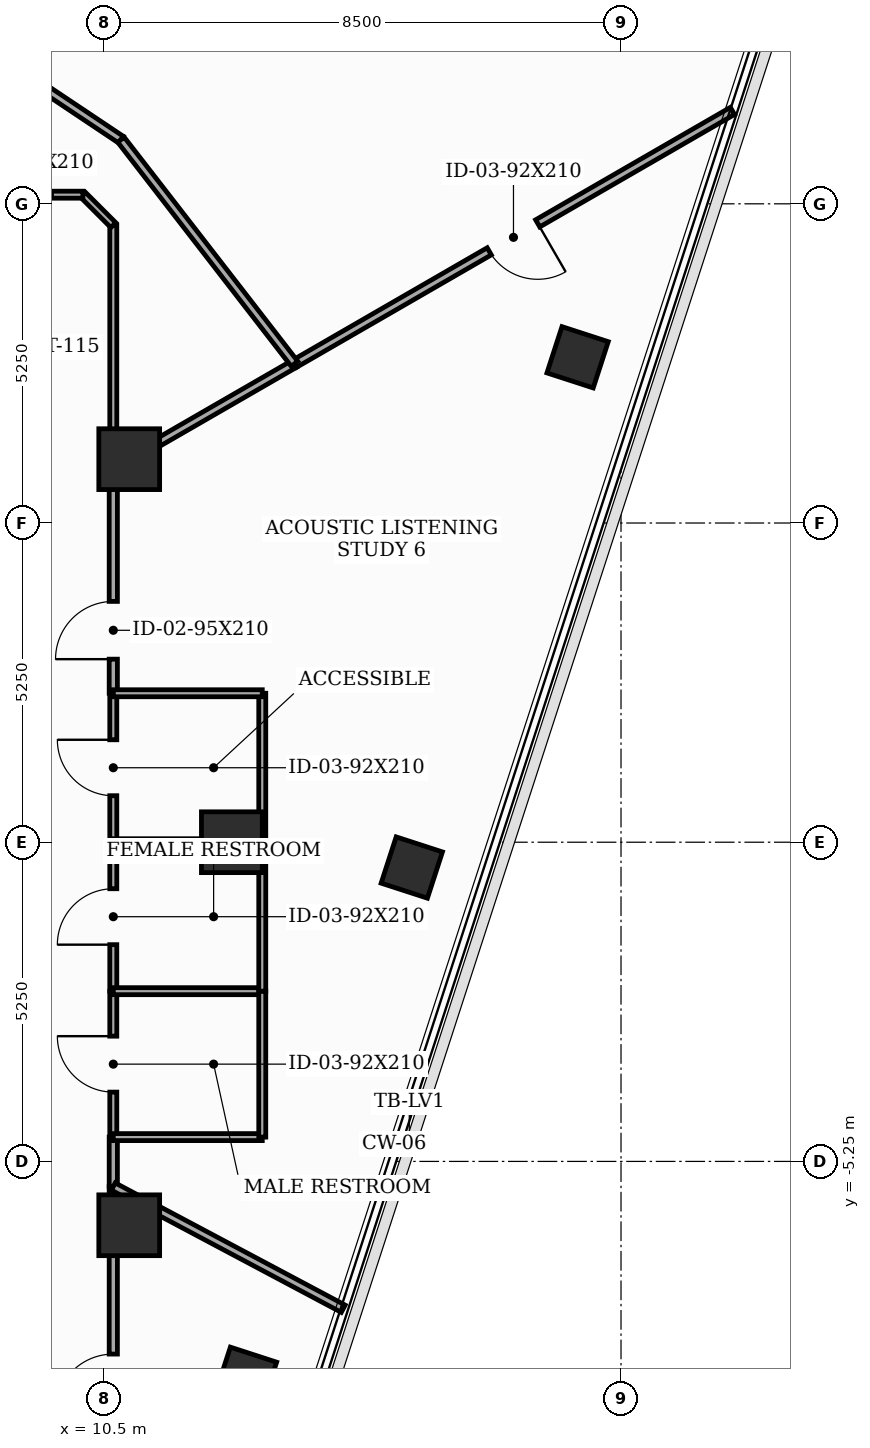
"""IFC4 building model, lengths in metres.
Left out: names, types, materials, properties, quantities, classifications, styles, units other than length and angle.
Written with IfcOpenShell. Run it as: python <this file> out.ifc"""

import sys

from ifc_helpers import new_model, si_unit, direction, frame, frame_2d, origin, origin_2d, place, context, subcontext, project, spatial, rectangle, extrude, element, fill, save


model = new_model("IFC4")
c1 = context("Model", 3, precision=1e-05, world=origin(), true_north=direction((0.0, 1.0)))
c2 = subcontext(c1, "Body", "Model", "MODEL_VIEW")
j1 = project(units=[si_unit("LENGTHUNIT", "METRE"), si_unit("PLANEANGLEUNIT", "RADIAN")], contexts=[c1])
p1 = place(None, origin())
s1 = spatial("IfcSite", under=j1, at=p1, CompositionType="ELEMENT")
p2 = place(p1, origin())
s2 = spatial("IfcBuilding", under=s1, at=p2, CompositionType="ELEMENT")
p3 = place(p2, frame((0.0, 0.0, 305.4)))
s3 = spatial("IfcBuildingStorey", under=s2, at=p3, CompositionType="ELEMENT", Elevation=305.4)
for number, where, z_axis, x_axis in (
    (1, (12.6, 0.0, 0.0), (0.0, 0.0, 1.0), (1.0, 0.0, 0.0)),
    (2, (10.912, 6.3, 0.0), (0.0, 0.0, 1.0), (1.0, 0.0, 0.0)),
    (3, (10.912, -6.3, 0.0), (0.0, 0.0, 1.0), (1.0, 0.0, 0.0)),
):
    element("IfcColumn", number, at=place(p3, frame(where, z_axis=z_axis, x_axis=x_axis)), inside=s3, PredefinedType="COLUMN", context=c2, shape_type="SweptSolid", body=[
        extrude(rectangle(XDim=1.0, YDim=1.0, at=origin_2d()), origin(), (0.0, 0.0, 1.0), 3.7),
    ])
for number, where, z_axis, x_axis in (
    (4, (12.833, -8.809, 0.0), (0.0, 0.0, 1.0), (0.309, 0.951, 0.0)),
    (5, (15.559, -0.417, 0.0), (0.0, 0.0, 1.0), (0.309, 0.951, 0.0)),
    (6, (18.286, 7.976, 0.0), (0.0, 0.0, 1.0), (0.309, 0.951, 0.0)),
):
    element("IfcColumn", number, at=place(p3, frame(where, z_axis=z_axis, x_axis=x_axis)), inside=s3, PredefinedType="COLUMN", context=c2, shape_type="SweptSolid", body=[
        extrude(rectangle(XDim=0.8, YDim=0.8, at=origin_2d()), origin(), (0.0, 0.0, 1.0), 3.7),
    ])
p4 = place(p3, frame((10.65, -10.15, 0.0), z_axis=(0.0, 0.0, 1.0), x_axis=(0.0, 1.0, 0.0)))
e7 = element("IfcWall", 7, at=p4, inside=s3, PredefinedType="PARTITIONING", context=c2, shape_type="SweptSolid", body=[
    extrude(rectangle(XDim=4.487, YDim=0.135, at=frame_2d((2.243, 0.0))), origin(), (0.0, 0.0, 1.0), 2.885),
])
p5 = place(p4, frame((0.781, 0.0, 0.0)))
e8 = element("IfcOpeningElement", 8, at=p5, cuts=e7, PredefinedType="OPENING", context=c2, shape_type="SweptSolid", body=[
    extrude(rectangle(XDim=0.95, YDim=2.1, at=frame_2d((0.475, 1.05))), frame((0.0, 0.077, 0.0), z_axis=(0.0, -1.0, 0.0), x_axis=(1.0, 0.0, 0.0)), (0.0, 0.0, 1.0), 0.155),
])
p6 = place(p3, frame((10.65, -4.85, 0.0), z_axis=(0.0, 0.0, 1.0), x_axis=(0.0, 1.0, 0.0)))
e9 = element("IfcWall", 9, at=p6, inside=s3, PredefinedType="PARTITIONING", context=c2, shape_type="SweptSolid", body=[
    extrude(rectangle(XDim=2.4, YDim=0.115, at=frame_2d((1.2, 0.0))), origin(), (0.0, 0.0, 1.0), 3.5),
])
p7 = place(p6, frame((0.74, 0.0, 0.0)))
e10 = element("IfcOpeningElement", 10, at=p7, cuts=e9, PredefinedType="OPENING", context=c2, shape_type="SweptSolid", body=[
    extrude(rectangle(XDim=0.92, YDim=2.1, at=frame_2d((0.46, 1.05))), frame((0.0, 0.067, 0.0), z_axis=(0.0, -1.0, 0.0), x_axis=(1.0, 0.0, 0.0)), (0.0, 0.0, 1.0), 0.135),
])
p8 = place(p3, frame((10.65, -2.45, 0.0), z_axis=(0.0, 0.0, 1.0), x_axis=(0.0, 1.0, 0.0)))
e11 = element("IfcWall", 11, at=p8, inside=s3, PredefinedType="PARTITIONING", context=c2, shape_type="SweptSolid", body=[
    extrude(rectangle(XDim=2.45, YDim=0.115, at=frame_2d((1.225, 0.0))), origin(), (0.0, 0.0, 1.0), 2.885),
])
p9 = place(p8, frame((0.765, 0.0, 0.0)))
e12 = element("IfcOpeningElement", 12, at=p9, cuts=e11, PredefinedType="OPENING", context=c2, shape_type="SweptSolid", body=[
    extrude(rectangle(XDim=0.92, YDim=2.1, at=frame_2d((0.46, 1.05))), frame((0.0, 0.067, 0.0), z_axis=(0.0, -1.0, 0.0), x_axis=(1.0, 0.0, 0.0)), (0.0, 0.0, 1.0), 0.135),
])
p10 = place(p3, frame((10.65, 0.0, 0.0), z_axis=(0.0, 0.0, 1.0), x_axis=(0.0, 1.0, 0.0)))
e13 = element("IfcWall", 13, at=p10, inside=s3, PredefinedType="PARTITIONING", context=c2, shape_type="SweptSolid", body=[
    extrude(rectangle(XDim=2.45, YDim=0.115, at=frame_2d((1.225, 0.0))), origin(), (0.0, 0.0, 1.0), 2.885),
])
p11 = place(p10, frame((0.765, 0.0, 0.0)))
e14 = element("IfcOpeningElement", 14, at=p11, cuts=e13, PredefinedType="OPENING", context=c2, shape_type="SweptSolid", body=[
    extrude(rectangle(XDim=0.92, YDim=2.1, at=frame_2d((0.46, 1.05))), frame((0.0, 0.067, 0.0), z_axis=(0.0, -1.0, 0.0), x_axis=(1.0, 0.0, 0.0)), (0.0, 0.0, 1.0), 0.135),
])
p12 = place(p3, frame((10.65, -5.663, 0.0), z_axis=(0.0, 0.0, 1.0), x_axis=(0.0, 1.0, 0.0)))
e15 = element("IfcWall", 15, at=p12, inside=s3, PredefinedType="PARTITIONING", context=c2, shape_type="SweptSolid", body=[
    extrude(rectangle(XDim=0.813, YDim=0.135, at=frame_2d((0.406, 0.0))), origin(), (0.0, 0.0, 1.0), 3.5),
])
p13 = place(p3, frame((10.65, 2.45, 0.0), z_axis=(0.0, 0.0, 1.0), x_axis=(0.0, 1.0, 0.0)))
e16 = element("IfcWall", 16, at=p13, inside=s3, PredefinedType="PARTITIONING", context=c2, shape_type="SweptSolid", body=[
    extrude(rectangle(XDim=3.699, YDim=0.135, at=frame_2d((1.85, 0.0))), origin(), (0.0, 0.0, 1.0), 3.5),
])
p14 = place(p13, frame((0.561, 0.0, 0.0)))
e17 = element("IfcOpeningElement", 17, at=p14, cuts=e16, PredefinedType="OPENING", context=c2, shape_type="SweptSolid", body=[
    extrude(rectangle(XDim=0.95, YDim=2.1, at=frame_2d((0.475, 1.05))), frame((0.0, 0.077, 0.0), z_axis=(0.0, -1.0, 0.0), x_axis=(1.0, 0.0, 0.0)), (0.0, 0.0, 1.0), 0.155),
])
p15 = place(p3, frame((10.65, 6.149, 0.0), z_axis=(0.0, 0.0, 1.0), x_axis=(0.0, 1.0, 0.0)))
e18 = element("IfcWall", 18, at=p15, inside=s3, PredefinedType="PARTITIONING", context=c2, shape_type="SweptSolid", body=[
    extrude(rectangle(XDim=4.001, YDim=0.115, at=frame_2d((2.0, 0.0))), origin(), (0.0, 0.0, 1.0), 2.885),
])
p16 = place(p3, frame((10.65, 10.15, 0.0), z_axis=(0.0, 0.0, 1.0), x_axis=(-0.707106781187, 0.707106781187, 0.0)))
e19 = element("IfcWall", 19, at=p16, inside=s3, PredefinedType="PARTITIONING", context=c2, shape_type="SweptSolid", body=[
    extrude(rectangle(XDim=0.707, YDim=0.115, at=frame_2d((0.354, 0.0))), origin(), (0.0, 0.0, 1.0), 3.5),
])
p17 = place(p3, frame((10.15, 10.65, 0.0), z_axis=(0.0, 0.0, 1.0), x_axis=(-1.0, 0.0, 0.0)))
e20 = element("IfcWall", 20, at=p17, inside=s3, PredefinedType="PARTITIONING", context=c2, shape_type="SweptSolid", body=[
    extrude(rectangle(XDim=4.956, YDim=0.115, at=frame_2d((2.478, 0.0))), origin(), (0.0, 0.0, 1.0), 2.885),
])
p18 = place(p17, frame((0.516, 0.0, 0.0)))
e21 = element("IfcOpeningElement", 21, at=p18, cuts=e20, PredefinedType="OPENING", context=c2, shape_type="SweptSolid", body=[
    extrude(rectangle(XDim=0.95, YDim=2.1, at=frame_2d((0.475, 1.05))), frame((0.0, 0.067, 0.0), z_axis=(0.0, -1.0, 0.0), x_axis=(1.0, 0.0, 0.0)), (0.0, 0.0, 1.0), 0.135),
])
p19 = place(p3, frame((14.432, -7.673, 0.0), z_axis=(0.0, 0.0, 1.0), x_axis=(-0.883046328231, 0.469285821433, 0.0)))
e22 = element("IfcWall", 22, at=p19, inside=s3, PredefinedType="PARTITIONING", context=c2, shape_type="SweptSolid", body=[
    extrude(rectangle(XDim=4.283, YDim=0.135, at=frame_2d((2.141, 0.0))), origin(), (0.0, 0.0, 1.0), 2.885),
])
for number, where, z_axis, x_axis in (
    (23, (13.1, -2.45, 0.0), (0.0, 0.0, 1.0), (-1.0, 0.0, 0.0)),
    (24, (10.65, -4.85, 0.0), (0.0, 0.0, 1.0), (1.0, 0.0, 0.0)),
):
    element("IfcWall", number, at=place(p3, frame(where, z_axis=z_axis, x_axis=x_axis)), inside=s3, PredefinedType="PARTITIONING", context=c2, shape_type="SweptSolid", body=[
        extrude(rectangle(XDim=2.45, YDim=0.115, at=frame_2d((1.225, 0.0))), origin(), (0.0, 0.0, 1.0), 2.885),
    ])
p20 = place(p3, frame((13.1, -4.85, 0.0), z_axis=(0.0, 0.0, 1.0), x_axis=(0.0, 1.0, 0.0)))
e25 = element("IfcWall", 25, at=p20, inside=s3, PredefinedType="PARTITIONING", context=c2, shape_type="SweptSolid", body=[
    extrude(rectangle(XDim=2.4, YDim=0.115, at=frame_2d((1.2, 0.0))), origin(), (0.0, 0.0, 1.0), 3.5),
])
p21 = place(p3, frame((13.1, 0.0, 0.0), z_axis=(0.0, 0.0, 1.0), x_axis=(-1.0, 0.0, 0.0)))
e26 = element("IfcWall", 26, at=p21, inside=s3, PredefinedType="PARTITIONING", context=c2, shape_type="SweptSolid", body=[
    extrude(rectangle(XDim=2.45, YDim=0.115, at=frame_2d((1.225, 0.0))), origin(), (0.0, 0.0, 1.0), 2.885),
])
for number, where, z_axis, x_axis in (
    (27, (13.1, -2.45, 0.0), (0.0, 0.0, 1.0), (0.0, 1.0, 0.0)),
    (28, (13.1, 0.0, 0.0), (0.0, 0.0, 1.0), (0.0, 1.0, 0.0)),
):
    element("IfcWall", number, at=place(p3, frame(where, z_axis=z_axis, x_axis=x_axis)), inside=s3, PredefinedType="PARTITIONING", context=c2, shape_type="SweptSolid", body=[
        extrude(rectangle(XDim=2.45, YDim=0.115, at=frame_2d((1.225, 0.0))), origin(), (0.0, 0.0, 1.0), 3.035),
    ])
p22 = place(p3, frame((13.1, 2.45, 0.0), z_axis=(0.0, 0.0, 1.0), x_axis=(-1.0, 0.0, 0.0)))
e29 = element("IfcWall", 29, at=p22, inside=s3, PredefinedType="PARTITIONING", context=c2, shape_type="SweptSolid", body=[
    extrude(rectangle(XDim=2.45, YDim=0.115, at=frame_2d((1.225, 0.0))), origin(), (0.0, 0.0, 1.0), 2.885),
])
p23 = place(p3, frame((20.833, 12.028, 0.0), z_axis=(0.0, 0.0, 1.0), x_axis=(-0.866007163819, -0.500031591216, 0.0)))
e30 = element("IfcWall", 30, at=p23, inside=s3, PredefinedType="PARTITIONING", context=c2, shape_type="SweptSolid", body=[
    extrude(rectangle(XDim=8.317, YDim=0.135, at=frame_2d((4.159, 0.0))), origin(), (0.0, 0.0, 1.0), 3.035),
])
p24 = place(p23, frame((3.698, 0.0, 0.0)))
e31 = element("IfcOpeningElement", 31, at=p24, cuts=e30, PredefinedType="OPENING", context=c2, shape_type="SweptSolid", body=[
    extrude(rectangle(XDim=0.92, YDim=2.1, at=frame_2d((0.46, 1.05))), frame((0.0, 0.077, 0.0), z_axis=(0.0, -1.0, 0.0), x_axis=(1.0, 0.0, 0.0)), (0.0, 0.0, 1.0), 0.155),
])
p25 = place(p3, frame((13.63, 7.869, 0.0), z_axis=(0.0, 0.0, 1.0), x_axis=(-0.866091067331, -0.499886250151, 0.0)))
e32 = element("IfcWall", 32, at=p25, inside=s3, PredefinedType="PARTITIONING", context=c2, shape_type="SweptSolid", body=[
    extrude(rectangle(XDim=3.441, YDim=0.135, at=frame_2d((1.72, 0.0))), origin(), (0.0, 0.0, 1.0), 2.885),
])
p26 = place(p3, frame((6.899, 14.145, 0.0), z_axis=(0.0, 0.0, 1.0), x_axis=(0.831510168033, -0.555509532283, 0.0)))
e33 = element("IfcWall", 33, at=p26, inside=s3, PredefinedType="PARTITIONING", context=c2, shape_type="SweptSolid", body=[
    extrude(rectangle(XDim=4.663, YDim=0.135, at=frame_2d((2.331, 0.0))), origin(), (0.0, 0.0, 1.0), 3.035),
])
p27 = place(p3, frame((10.776, 11.555, 0.0), z_axis=(0.0, 0.0, 1.0), x_axis=(0.612213330569, -0.790692631731, 0.0)))
e34 = element("IfcWall", 34, at=p27, inside=s3, PredefinedType="PARTITIONING", context=c2, shape_type="SweptSolid", body=[
    extrude(rectangle(XDim=4.662, YDim=0.135, at=frame_2d((2.331, 0.0))), origin(), (0.0, 0.0, 1.0), 3.215),
])
p28 = place(p5, origin())
e35 = element("IfcDoor", 35, at=p28, inside=s3, OperationType="SINGLE_SWING_LEFT", PredefinedType="DOOR", context=c2, shape_type="SweptSolid", body=[
    extrude(rectangle(XDim=0.95, YDim=2.1, at=frame_2d((0.475, 1.05))), frame((0.0, 0.025, 0.0), z_axis=(0.0, -1.0, 0.0), x_axis=(1.0, 0.0, 0.0)), (0.0, 0.0, 1.0), 0.05),
])
fill(e8, e35)
p29 = place(p7, origin())
e36 = element("IfcDoor", 36, at=p29, inside=s3, OperationType="SINGLE_SWING_RIGHT", PredefinedType="DOOR", context=c2, shape_type="SweptSolid", body=[
    extrude(rectangle(XDim=0.92, YDim=2.1, at=frame_2d((0.46, 1.05))), frame((0.0, 0.025, 0.0), z_axis=(0.0, -1.0, 0.0), x_axis=(1.0, 0.0, 0.0)), (0.0, 0.0, 1.0), 0.05),
])
fill(e10, e36)
p30 = place(p9, origin())
e37 = element("IfcDoor", 37, at=p30, inside=s3, OperationType="SINGLE_SWING_LEFT", PredefinedType="DOOR", context=c2, shape_type="SweptSolid", body=[
    extrude(rectangle(XDim=0.92, YDim=2.1, at=frame_2d((0.46, 1.05))), frame((0.0, 0.025, 0.0), z_axis=(0.0, -1.0, 0.0), x_axis=(1.0, 0.0, 0.0)), (0.0, 0.0, 1.0), 0.05),
])
fill(e12, e37)
p31 = place(p11, origin())
e38 = element("IfcDoor", 38, at=p31, inside=s3, OperationType="SINGLE_SWING_RIGHT", PredefinedType="DOOR", context=c2, shape_type="SweptSolid", body=[
    extrude(rectangle(XDim=0.92, YDim=2.1, at=frame_2d((0.46, 1.05))), frame((0.0, 0.025, 0.0), z_axis=(0.0, -1.0, 0.0), x_axis=(1.0, 0.0, 0.0)), (0.0, 0.0, 1.0), 0.05),
])
fill(e14, e38)
p32 = place(p14, origin())
e39 = element("IfcDoor", 39, at=p32, inside=s3, OperationType="SINGLE_SWING_LEFT", PredefinedType="DOOR", context=c2, shape_type="SweptSolid", body=[
    extrude(rectangle(XDim=0.95, YDim=2.1, at=frame_2d((0.475, 1.05))), frame((0.0, 0.025, 0.0), z_axis=(0.0, -1.0, 0.0), x_axis=(1.0, 0.0, 0.0)), (0.0, 0.0, 1.0), 0.05),
])
fill(e17, e39)
p33 = place(p24, origin())
e40 = element("IfcDoor", 40, at=p33, inside=s3, OperationType="SINGLE_SWING_LEFT", PredefinedType="DOOR", context=c2, shape_type="SweptSolid", body=[
    extrude(rectangle(XDim=0.92, YDim=2.1, at=frame_2d((0.46, 1.05))), frame((0.0, 0.025, 0.0), z_axis=(0.0, -1.0, 0.0), x_axis=(1.0, 0.0, 0.0)), (0.0, 0.0, 1.0), 0.05),
])
fill(e31, e40)
save(model, sys.argv[1])
